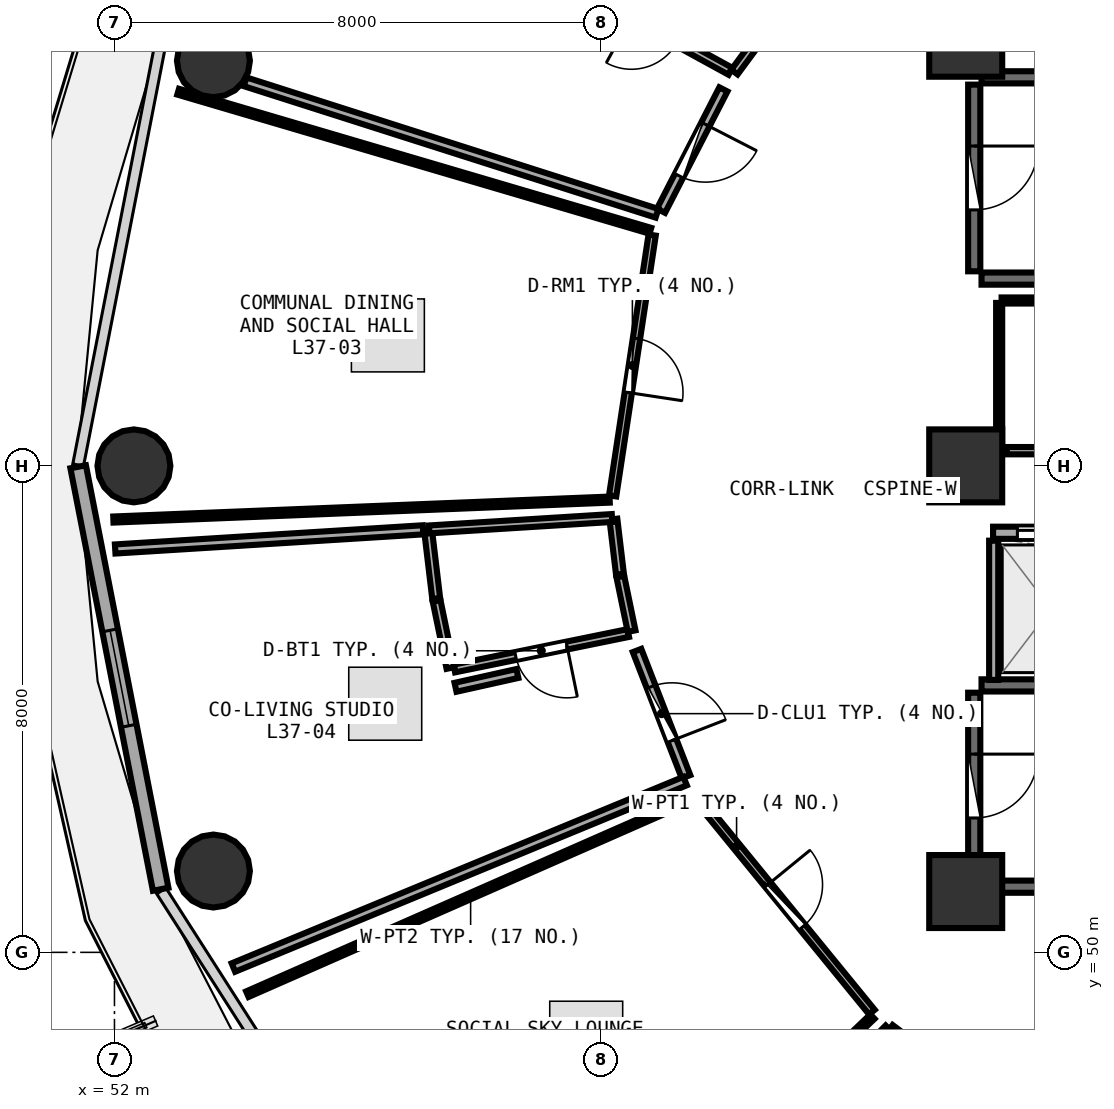
"""IFC4 building model, lengths in metres.
Left out: names, types, materials, properties, quantities, classifications, styles, units other than length and angle.
Written with IfcOpenShell. Run it as: python <this file> out.ifc"""

import sys

from ifc_helpers import new_model, si_unit, direction, frame, frame_2d, origin, origin_2d, place, context, subcontext, project, spatial, rectangle, circle, extrude, element, fill, save


model = new_model("IFC4")
c1 = context("Model", 3, precision=1e-05, world=origin(), true_north=direction((0.0, 1.0)))
c2 = subcontext(c1, "Body", "Model", "MODEL_VIEW")
j1 = project(units=[si_unit("LENGTHUNIT", "METRE"), si_unit("PLANEANGLEUNIT", "RADIAN")], contexts=[c1])
p1 = place(None, origin())
s1 = spatial("IfcSite", under=j1, at=p1, CompositionType="ELEMENT")
p2 = place(p1, origin())
s2 = spatial("IfcBuilding", under=s1, at=p2, CompositionType="ELEMENT")
p3 = place(p2, frame((0.0, 0.0, 146.85)))
s3 = spatial("IfcBuildingStorey", under=s2, at=p3, CompositionType="ELEMENT", Elevation=146.85)
for number, where, z_axis, x_axis in (
    (1, (66.0, 51.0, 0.0), (0.0, 0.0, 1.0), (1.0, 0.0, 0.0)),
    (2, (66.0, 65.0, 0.0), (0.0, 0.0, 1.0), (1.0, 0.0, 0.0)),
    (3, (66.0, 58.0, 0.0), (0.0, 0.0, 1.0), (1.0, 0.0, 0.0)),
):
    element("IfcColumn", number, at=place(p3, frame(where, z_axis=z_axis, x_axis=x_axis)), inside=s3, PredefinedType="PILASTER", context=c2, shape_type="SweptSolid", body=[
        extrude(rectangle(XDim=1.2, YDim=1.2, at=origin_2d()), origin(), (0.0, 0.0, 1.0), 3.75),
    ])
for number, where, z_axis, x_axis in (
    (4, (53.627, 64.663, 0.0), (0.0, 0.0, 1.0), (1.0, 0.0, 0.0)),
    (5, (52.32, 58.0, 0.0), (0.0, 0.0, 1.0), (1.0, 0.0, 0.0)),
    (6, (53.627, 51.337, 0.0), (0.0, 0.0, 1.0), (1.0, 0.0, 0.0)),
):
    element("IfcColumn", number, at=place(p3, frame(where, z_axis=z_axis, x_axis=x_axis)), inside=s3, PredefinedType="COLUMN", context=c2, shape_type="SweptSolid", body=[
        extrude(circle(Radius=0.6, at=origin_2d()), origin(), (0.0, 0.0, 1.0), 3.75),
    ])
p4 = place(p3, frame((51.403, 57.985, 0.0), z_axis=(0.0, 0.0, 1.0), x_axis=(0.191716984769, -0.981450252306, 0.0)))
e7 = element("IfcWall", 7, at=p4, inside=s3, PredefinedType="SOLIDWALL", context=c2, shape_type="SweptSolid", body=[
    extrude(rectangle(XDim=7.079, YDim=0.26, at=frame_2d((3.54, 0.0))), origin(), (0.0, 0.0, 1.0), 3.475),
])
p5 = place(p4, frame((2.74, 0.0, 0.85)))
e8 = element("IfcOpeningElement", 8, at=p5, cuts=e7, PredefinedType="OPENING", context=c2, shape_type="SweptSolid", body=[
    extrude(rectangle(XDim=1.6, YDim=1.45, at=frame_2d((0.8, 0.725))), frame((0.0, 0.14, 0.0), z_axis=(0.0, -1.0, 0.0), x_axis=(1.0, 0.0, 0.0)), (0.0, 0.0, 1.0), 0.28),
])
for number, where, z_axis, x_axis in (
    (9, (66.26, 61.08, 0.0), (0.0, 0.0, 1.0), (1.0, 0.0, 0.0)),
    (10, (73.42, 64.39, 0.0), (0.0, 0.0, 1.0), (-1.0, 0.0, 0.0)),
):
    element("IfcWall", number, at=place(p3, frame(where, z_axis=z_axis, x_axis=x_axis)), inside=s3, PredefinedType="SHEAR", context=c2, shape_type="SweptSolid", body=[
        extrude(rectangle(XDim=7.16, YDim=0.2, at=frame_2d((3.58, 0.0))), origin(), (0.0, 0.0, 1.0), 3.49),
    ])
p6 = place(p3, frame((66.14, 64.27, 0.0), z_axis=(0.0, 0.0, 1.0), x_axis=(0.0, -1.0, 0.0)))
e11 = element("IfcWall", 11, at=p6, inside=s3, PredefinedType="SHEAR", context=c2, shape_type="SweptSolid", body=[
    extrude(rectangle(XDim=3.07, YDim=0.2, at=frame_2d((1.535, 0.0))), origin(), (0.0, 0.0, 1.0), 3.49),
])
p7 = place(p6, frame((1.01, 0.0, 0.0)))
e12 = element("IfcOpeningElement", 12, at=p7, cuts=e11, PredefinedType="OPENING", context=c2, shape_type="SweptSolid", body=[
    extrude(rectangle(XDim=1.05, YDim=2.1, at=frame_2d((0.525, 1.05))), frame((0.0, 0.11, 0.0), z_axis=(0.0, -1.0, 0.0), x_axis=(1.0, 0.0, 0.0)), (0.0, 0.0, 1.0), 0.22),
])
for number, where, z_axis, x_axis in (
    (13, (66.26, 51.08, 0.0), (0.0, 0.0, 1.0), (1.0, 0.0, 0.0)),
    (14, (73.42, 54.39, 0.0), (0.0, 0.0, 1.0), (-1.0, 0.0, 0.0)),
):
    element("IfcWall", number, at=place(p3, frame(where, z_axis=z_axis, x_axis=x_axis)), inside=s3, PredefinedType="SHEAR", context=c2, shape_type="SweptSolid", body=[
        extrude(rectangle(XDim=7.16, YDim=0.2, at=frame_2d((3.58, 0.0))), origin(), (0.0, 0.0, 1.0), 3.49),
    ])
p8 = place(p3, frame((66.14, 54.27, 0.0), z_axis=(0.0, 0.0, 1.0), x_axis=(0.0, -1.0, 0.0)))
e15 = element("IfcWall", 15, at=p8, inside=s3, PredefinedType="SHEAR", context=c2, shape_type="SweptSolid", body=[
    extrude(rectangle(XDim=3.07, YDim=0.2, at=frame_2d((1.535, 0.0))), origin(), (0.0, 0.0, 1.0), 3.49),
])
p9 = place(p8, frame((1.01, 0.0, 0.0)))
e16 = element("IfcOpeningElement", 16, at=p9, cuts=e15, PredefinedType="OPENING", context=c2, shape_type="SweptSolid", body=[
    extrude(rectangle(XDim=1.05, YDim=2.1, at=frame_2d((0.525, 1.05))), frame((0.0, 0.11, 0.0), z_axis=(0.0, -1.0, 0.0), x_axis=(1.0, 0.0, 0.0)), (0.0, 0.0, 1.0), 0.22),
])
p10 = place(p3, frame((66.45, 56.9, 0.0), z_axis=(0.0, 0.0, 1.0), x_axis=(1.0, 0.0, 0.0)))
e17 = element("IfcWall", 17, at=p10, inside=s3, PredefinedType="SOLIDWALL", context=c2, shape_type="SweptSolid", body=[
    extrude(rectangle(XDim=14.4, YDim=0.2, at=frame_2d((7.2, 0.0))), origin(), (0.0, 0.0, 1.0), 3.48),
])
p11 = place(p10, frame((0.4, 0.0, 0.0)))
e18 = element("IfcOpeningElement", 18, at=p11, cuts=e17, PredefinedType="OPENING", context=c2, shape_type="SweptSolid", body=[
    extrude(rectangle(XDim=1.1, YDim=2.1, at=frame_2d((0.55, 1.05))), frame((0.0, 0.11, 0.0), z_axis=(0.0, -1.0, 0.0), x_axis=(1.0, 0.0, 0.0)), (0.0, 0.0, 1.0), 0.22),
])
p12 = place(p10, frame((2.4, 0.0, 0.0)))
e19 = element("IfcOpeningElement", 19, at=p12, cuts=e17, PredefinedType="OPENING", context=c2, shape_type="SweptSolid", body=[
    extrude(rectangle(XDim=1.1, YDim=2.1, at=frame_2d((0.55, 1.05))), frame((0.0, 0.11, 0.0), z_axis=(0.0, -1.0, 0.0), x_axis=(1.0, 0.0, 0.0)), (0.0, 0.0, 1.0), 0.22),
])
p13 = place(p10, frame((4.4, 0.0, 0.0)))
e20 = element("IfcOpeningElement", 20, at=p13, cuts=e17, PredefinedType="OPENING", context=c2, shape_type="SweptSolid", body=[
    extrude(rectangle(XDim=1.1, YDim=2.1, at=frame_2d((0.55, 1.05))), frame((0.0, 0.11, 0.0), z_axis=(0.0, -1.0, 0.0), x_axis=(1.0, 0.0, 0.0)), (0.0, 0.0, 1.0), 0.22),
])
p14 = place(p3, frame((66.46, 54.48, 0.0), z_axis=(0.0, 0.0, 1.0), x_axis=(0.0, 1.0, 0.0)))
e21 = element("IfcWall", 21, at=p14, inside=s3, PredefinedType="PARTITIONING", context=c2, shape_type="SweptSolid", body=[
    extrude(rectangle(XDim=2.29, YDim=0.15, at=frame_2d((1.145, 0.0))), origin(), (0.0, 0.0, 1.0), 3.48),
])
p15 = place(p3, frame((66.675, 58.25, 0.0), z_axis=(0.0, 0.0, 1.0), x_axis=(1.0, 0.0, 0.0)))
e22 = element("IfcWall", 22, at=p15, inside=s3, PredefinedType="PARTITIONING", context=c2, shape_type="SweptSolid", body=[
    extrude(rectangle(XDim=3.265, YDim=0.12, at=frame_2d((1.632, 0.0))), origin(), (0.0, 0.0, 1.0), 3.48),
])
p16 = place(p15, frame((1.182, 0.0, 0.0)))
e23 = element("IfcOpeningElement", 23, at=p16, cuts=e22, PredefinedType="OPENING", context=c2, shape_type="SweptSolid", body=[
    extrude(rectangle(XDim=0.9, YDim=2.08, at=frame_2d((0.45, 1.04))), frame((0.0, 0.07, 0.0), z_axis=(0.0, -1.0, 0.0), x_axis=(1.0, 0.0, 0.0)), (0.0, 0.0, 1.0), 0.14),
])
p17 = place(p3, frame((62.131, 64.489, 0.0), z_axis=(0.0, 0.0, 1.0), x_axis=(-0.87680194327, 0.480851694681, 0.0)))
e24 = element("IfcWall", 24, at=p17, inside=s3, PredefinedType="PLUMBINGWALL", context=c2, shape_type="SweptSolid", body=[
    extrude(rectangle(XDim=2.855, YDim=0.13, at=frame_2d((1.428, 0.0))), origin(), (0.0, 0.0, 1.0), 2.975),
])
p18 = place(p17, frame((0.998, 0.0, 0.0)))
e25 = element("IfcOpeningElement", 25, at=p18, cuts=e24, PredefinedType="OPENING", context=c2, shape_type="SweptSolid", body=[
    extrude(rectangle(XDim=0.86, YDim=2.05, at=frame_2d((0.43, 1.025))), frame((0.0, 0.075, 0.0), z_axis=(0.0, -1.0, 0.0), x_axis=(1.0, 0.0, 0.0)), (0.0, 0.0, 1.0), 0.15),
])
p19 = place(p3, frame((62.015, 64.192, 0.0), z_axis=(0.0, 0.0, 1.0), x_axis=(-0.457234963971, -0.889345932538, 0.0)))
e26 = element("IfcWall", 26, at=p19, inside=s3, PredefinedType="PARTITIONING", context=c2, shape_type="SweptSolid", body=[
    extrude(rectangle(XDim=2.245, YDim=0.15, at=frame_2d((1.122, 0.0))), origin(), (0.0, 0.0, 1.0), 3.235),
])
p20 = place(p19, frame((0.647, 0.0, 0.0)))
e27 = element("IfcOpeningElement", 27, at=p20, cuts=e26, PredefinedType="OPENING", context=c2, shape_type="SweptSolid", body=[
    extrude(rectangle(XDim=0.95, YDim=2.08, at=frame_2d((0.475, 1.04))), frame((0.0, 0.085, 0.0), z_axis=(0.0, -1.0, 0.0), x_axis=(1.0, 0.0, 0.0)), (0.0, 0.0, 1.0), 0.17),
])
p21 = place(p3, frame((60.843, 61.796, 0.0), z_axis=(0.0, 0.0, 1.0), x_axis=(-0.149807046494, -0.988715251638, 0.0)))
e28 = element("IfcWall", 28, at=p21, inside=s3, PredefinedType="PARTITIONING", context=c2, shape_type="SweptSolid", body=[
    extrude(rectangle(XDim=4.338, YDim=0.12, at=frame_2d((2.169, 0.0))), origin(), (0.0, 0.0, 1.0), 2.975),
])
p22 = place(p21, frame((1.719, 0.0, 0.0)))
e29 = element("IfcOpeningElement", 29, at=p22, cuts=e28, PredefinedType="OPENING", context=c2, shape_type="SweptSolid", body=[
    extrude(rectangle(XDim=0.9, YDim=2.08, at=frame_2d((0.45, 1.04))), frame((0.0, 0.07, 0.0), z_axis=(0.0, -1.0, 0.0), x_axis=(1.0, 0.0, 0.0)), (0.0, 0.0, 1.0), 0.14),
])
p23 = place(p3, frame((60.45, 55.251, 0.0), z_axis=(0.0, 0.0, 1.0), x_axis=(-0.979866857251, -0.199652052484, 0.0)))
e30 = element("IfcWall", 30, at=p23, inside=s3, PredefinedType="PLUMBINGWALL", context=c2, shape_type="SweptSolid", body=[
    extrude(rectangle(XDim=2.92, YDim=0.13, at=frame_2d((1.46, 0.0))), origin(), (0.0, 0.0, 1.0), 3.175),
])
p24 = place(p23, frame((1.03, 0.0, 0.0)))
e31 = element("IfcOpeningElement", 31, at=p24, cuts=e30, PredefinedType="OPENING", context=c2, shape_type="SweptSolid", body=[
    extrude(rectangle(XDim=0.86, YDim=2.05, at=frame_2d((0.43, 1.025))), frame((0.0, 0.075, 0.0), z_axis=(0.0, -1.0, 0.0), x_axis=(1.0, 0.0, 0.0)), (0.0, 0.0, 1.0), 0.15),
])
p25 = place(p3, frame((60.595, 54.964, 0.0), z_axis=(0.0, 0.0, 1.0), x_axis=(0.361769005858, -0.932267765398, 0.0)))
e32 = element("IfcWall", 32, at=p25, inside=s3, PredefinedType="PARTITIONING", context=c2, shape_type="SweptSolid", body=[
    extrude(rectangle(XDim=2.227, YDim=0.15, at=frame_2d((1.114, 0.0))), origin(), (0.0, 0.0, 1.0), 3.235),
])
p26 = place(p25, frame((0.639, 0.0, 0.0)))
e33 = element("IfcOpeningElement", 33, at=p26, cuts=e32, PredefinedType="OPENING", context=c2, shape_type="SweptSolid", body=[
    extrude(rectangle(XDim=0.95, YDim=2.08, at=frame_2d((0.475, 1.04))), frame((0.0, 0.085, 0.0), z_axis=(0.0, -1.0, 0.0), x_axis=(1.0, 0.0, 0.0)), (0.0, 0.0, 1.0), 0.17),
])
p27 = place(p3, frame((61.604, 52.511, 0.0), z_axis=(0.0, 0.0, 1.0), x_axis=(0.632491819148, -0.77456703952, 0.0)))
e34 = element("IfcWall", 34, at=p27, inside=s3, PredefinedType="PARTITIONING", context=c2, shape_type="SweptSolid", body=[
    extrude(rectangle(XDim=4.511, YDim=0.12, at=frame_2d((2.255, 0.0))), origin(), (0.0, 0.0, 1.0), 2.975),
])
p28 = place(p27, frame((1.805, 0.0, 0.0)))
e35 = element("IfcOpeningElement", 35, at=p28, cuts=e34, PredefinedType="OPENING", context=c2, shape_type="SweptSolid", body=[
    extrude(rectangle(XDim=0.9, YDim=2.08, at=frame_2d((0.45, 1.04))), frame((0.0, 0.07, 0.0), z_axis=(0.0, -1.0, 0.0), x_axis=(1.0, 0.0, 0.0)), (0.0, 0.0, 1.0), 0.14),
])
p29 = place(p3, frame((69.96, 60.72, 0.0), z_axis=(0.0, 0.0, 1.0), x_axis=(-1.0, 0.0, 0.0)))
e36 = element("IfcWall", 36, at=p29, inside=s3, PredefinedType="PARTITIONING", context=c2, shape_type="SweptSolid", body=[
    extrude(rectangle(XDim=3.37, YDim=0.1, at=frame_2d((1.685, 0.0))), origin(), (0.0, 0.0, 1.0), 3.48),
])
p30 = place(p3, frame((66.55, 60.68, 0.0), z_axis=(0.0, 0.0, 1.0), x_axis=(0.0, -1.0, 0.0)))
e37 = element("IfcWall", 37, at=p30, inside=s3, PredefinedType="PARTITIONING", context=c2, shape_type="SweptSolid", body=[
    extrude(rectangle(XDim=2.383, YDim=0.1, at=frame_2d((1.191, 0.0))), origin(), (0.0, 0.0, 1.0), 3.48),
])
p31 = place(p3, frame((62.757, 65.237, 0.0), z_axis=(0.0, 0.0, 1.0), x_axis=(-0.593701036402, -0.804685702231, 0.0)))
e38 = element("IfcWall", 38, at=p31, inside=s3, PredefinedType="PLUMBINGWALL", context=c2, shape_type="SweptSolid", body=[
    extrude(rectangle(XDim=0.945, YDim=0.13, at=frame_2d((0.473, 0.0))), origin(), (0.0, 0.0, 1.0), 2.975),
])
p32 = place(p3, frame((60.923, 62.154, 0.0), z_axis=(0.0, 0.0, 1.0), x_axis=(-0.952653075659, 0.304059397878, 0.0)))
e39 = element("IfcWall", 39, at=p32, inside=s3, PredefinedType="PARTITIONING", context=c2, shape_type="SweptSolid", body=[
    extrude(rectangle(XDim=7.112, YDim=0.15, at=frame_2d((3.556, 0.0))), origin(), (0.0, 0.0, 1.0), 3.175),
])
p33 = place(p3, frame((60.144, 57.445, 0.0), z_axis=(0.0, 0.0, 1.0), x_axis=(-0.99919531507, -0.040108881097, 0.0)))
e40 = element("IfcWall", 40, at=p33, inside=s3, PredefinedType="PARTITIONING", context=c2, shape_type="SweptSolid", body=[
    extrude(rectangle(XDim=8.169, YDim=0.1, at=frame_2d((4.084, 0.0))), origin(), (0.0, 0.0, 1.0), 3.025),
])
p34 = place(p3, frame((53.047, 64.154, 0.0), z_axis=(0.0, 0.0, 1.0), x_axis=(0.959252584651, -0.282549958133, 0.0)))
e41 = element("IfcWall", 41, at=p34, inside=s3, PredefinedType="PARTITIONING", context=c2, shape_type="SweptSolid", body=[
    extrude(rectangle(XDim=8.096, YDim=0.1, at=frame_2d((4.048, 0.0))), origin(), (0.0, 0.0, 1.0), 3.025),
])
p35 = place(p3, frame((60.205, 57.124, 0.0), z_axis=(0.0, 0.0, 1.0), x_axis=(0.118797046487, -0.992918557459, 0.0)))
e42 = element("IfcWall", 42, at=p35, inside=s3, PredefinedType="PLUMBINGWALL", context=c2, shape_type="SweptSolid", body=[
    extrude(rectangle(XDim=0.912, YDim=0.13, at=frame_2d((0.456, 0.0))), origin(), (0.0, 0.0, 1.0), 3.48),
])
p36 = place(p3, frame((60.32, 56.178, 0.0), z_axis=(0.0, 0.0, 1.0), x_axis=(0.202067144879, -0.979371670491, 0.0)))
e43 = element("IfcWall", 43, at=p36, inside=s3, PredefinedType="PLUMBINGWALL", context=c2, shape_type="SweptSolid", body=[
    extrude(rectangle(XDim=0.915, YDim=0.13, at=frame_2d((0.457, 0.0))), origin(), (0.0, 0.0, 1.0), 3.48),
])
p37 = place(p3, frame((57.526, 54.676, 0.0), z_axis=(0.0, 0.0, 1.0), x_axis=(-0.202111317069, 0.979362555703, 0.0)))
e44 = element("IfcWall", 44, at=p37, inside=s3, PredefinedType="PLUMBINGWALL", context=c2, shape_type="SweptSolid", body=[
    extrude(rectangle(XDim=1.127, YDim=0.13, at=frame_2d((0.563, 0.0))), origin(), (0.0, 0.0, 1.0), 3.48),
])
p38 = place(p3, frame((57.292, 55.819, 0.0), z_axis=(0.0, 0.0, 1.0), x_axis=(-0.11846804652, 0.992957865145, 0.0)))
e45 = element("IfcWall", 45, at=p38, inside=s3, PredefinedType="PLUMBINGWALL", context=c2, shape_type="SweptSolid", body=[
    extrude(rectangle(XDim=1.123, YDim=0.13, at=frame_2d((0.562, 0.0))), origin(), (0.0, 0.0, 1.0), 3.48),
])
p39 = place(p3, frame((57.176, 56.955, 0.0), z_axis=(0.0, 0.0, 1.0), x_axis=(0.998056675164, 0.062312704652, 0.0)))
e46 = element("IfcWall", 46, at=p39, inside=s3, PredefinedType="PLUMBINGWALL", context=c2, shape_type="SweptSolid", body=[
    extrude(rectangle(XDim=3.013, YDim=0.13, at=frame_2d((1.506, 0.0))), origin(), (0.0, 0.0, 1.0), 3.175),
])
p40 = place(p3, frame((61.385, 52.817, 0.0), z_axis=(0.0, 0.0, 1.0), x_axis=(-0.924352507704, -0.381539567412, 0.0)))
e47 = element("IfcWall", 47, at=p40, inside=s3, PredefinedType="PARTITIONING", context=c2, shape_type="SweptSolid", body=[
    extrude(rectangle(XDim=8.037, YDim=0.15, at=frame_2d((4.019, 0.0))), origin(), (0.0, 0.0, 1.0), 2.975),
])
p41 = place(p3, frame((52.012, 56.634, 0.0), z_axis=(0.0, 0.0, 1.0), x_axis=(0.998071814667, 0.062069741162, 0.0)))
e48 = element("IfcWall", 48, at=p41, inside=s3, PredefinedType="PARTITIONING", context=c2, shape_type="SweptSolid", body=[
    extrude(rectangle(XDim=5.074, YDim=0.15, at=frame_2d((2.537, 0.0))), origin(), (0.0, 0.0, 1.0), 3.025),
])
p42 = place(p3, frame((57.609, 54.359, 0.0), z_axis=(0.0, 0.0, 1.0), x_axis=(0.97598825513, 0.217823152693, 0.0)))
e49 = element("IfcWall", 49, at=p42, inside=s3, PredefinedType="PARTITIONING", context=c2, shape_type="SweptSolid", body=[
    extrude(rectangle(XDim=1.042, YDim=0.15, at=frame_2d((0.521, 0.0))), origin(), (0.0, 0.0, 1.0), 3.175),
])
p43 = place(p3, frame((64.466, 48.943, 0.0), z_axis=(0.0, 0.0, 1.0), x_axis=(-0.723511266615, -0.690312572014, 0.0)))
e50 = element("IfcWall", 50, at=p43, inside=s3, PredefinedType="PARTITIONING", context=c2, shape_type="SweptSolid", body=[
    extrude(rectangle(XDim=7.758, YDim=0.1, at=frame_2d((3.879, 0.0))), origin(), (0.0, 0.0, 1.0), 3.025),
])
p44 = place(p3, frame((54.186, 49.312, 0.0), z_axis=(0.0, 0.0, 1.0), x_axis=(0.915373356269, 0.402606034024, 0.0)))
e51 = element("IfcWall", 51, at=p44, inside=s3, PredefinedType="PARTITIONING", context=c2, shape_type="SweptSolid", body=[
    extrude(rectangle(XDim=8.023, YDim=0.1, at=frame_2d((4.011, 0.0))), origin(), (0.0, 0.0, 1.0), 2.975),
])
p45 = place(p3, frame((64.759, 48.753, 0.0), z_axis=(0.0, 0.0, 1.0), x_axis=(0.800390142897, -0.599479456824, 0.0)))
e52 = element("IfcWall", 52, at=p45, inside=s3, PredefinedType="PLUMBINGWALL", context=c2, shape_type="SweptSolid", body=[
    extrude(rectangle(XDim=0.976, YDim=0.13, at=frame_2d((0.488, 0.0))), origin(), (0.0, 0.0, 1.0), 2.975),
])
p46 = place(p3, frame((62.713, 46.733, 0.0), z_axis=(0.0, 0.0, 1.0), x_axis=(0.706764315195, 0.707449081396, 0.0)))
e53 = element("IfcWall", 53, at=p46, inside=s3, PredefinedType="PLUMBINGWALL", context=c2, shape_type="SweptSolid", body=[
    extrude(rectangle(XDim=2.852, YDim=0.13, at=frame_2d((1.426, 0.0))), origin(), (0.0, 0.0, 1.0), 3.235),
])
p47 = place(p5, origin())
e54 = element("IfcWindow", 54, at=p47, inside=s3, PartitioningType="SINGLE_PANEL", PredefinedType="WINDOW", context=c2, shape_type="SweptSolid", body=[
    extrude(rectangle(XDim=1.6, YDim=1.45, at=frame_2d((0.8, 0.725))), frame((0.0, 0.03, 0.0), z_axis=(0.0, -1.0, 0.0), x_axis=(1.0, 0.0, 0.0)), (0.0, 0.0, 1.0), 0.06),
])
fill(e8, e54)
p48 = place(p7, origin())
e55 = element("IfcDoor", 55, at=p48, inside=s3, OperationType="SINGLE_SWING_LEFT", PredefinedType="DOOR", context=c2, shape_type="SweptSolid", body=[
    extrude(rectangle(XDim=1.05, YDim=2.1, at=frame_2d((0.525, 1.05))), frame((0.0, 0.025, 0.0), z_axis=(0.0, -1.0, 0.0), x_axis=(1.0, 0.0, 0.0)), (0.0, 0.0, 1.0), 0.05),
])
fill(e12, e55)
p49 = place(p9, origin())
e56 = element("IfcDoor", 56, at=p49, inside=s3, OperationType="SINGLE_SWING_LEFT", PredefinedType="DOOR", context=c2, shape_type="SweptSolid", body=[
    extrude(rectangle(XDim=1.05, YDim=2.1, at=frame_2d((0.525, 1.05))), frame((0.0, 0.025, 0.0), z_axis=(0.0, -1.0, 0.0), x_axis=(1.0, 0.0, 0.0)), (0.0, 0.0, 1.0), 0.05),
])
fill(e16, e56)
p50 = place(p11, origin())
e57 = element("IfcDoor", 57, at=p50, inside=s3, OperationType="DOUBLE_DOOR_SLIDING", PredefinedType="DOOR", context=c2, shape_type="SweptSolid", body=[
    extrude(rectangle(XDim=1.1, YDim=2.1, at=frame_2d((0.55, 1.05))), frame((0.0, 0.025, 0.0), z_axis=(0.0, -1.0, 0.0), x_axis=(1.0, 0.0, 0.0)), (0.0, 0.0, 1.0), 0.05),
])
fill(e18, e57)
p51 = place(p20, origin())
e58 = element("IfcDoor", 58, at=p51, inside=s3, OperationType="SINGLE_SWING_LEFT", PredefinedType="DOOR", context=c2, shape_type="SweptSolid", body=[
    extrude(rectangle(XDim=0.95, YDim=2.08, at=frame_2d((0.475, 1.04))), frame((0.0, 0.025, 0.0), z_axis=(0.0, -1.0, 0.0), x_axis=(1.0, 0.0, 0.0)), (0.0, 0.0, 1.0), 0.05),
])
fill(e27, e58)
p52 = place(p22, origin())
e59 = element("IfcDoor", 59, at=p52, inside=s3, OperationType="SINGLE_SWING_RIGHT", PredefinedType="DOOR", context=c2, shape_type="SweptSolid", body=[
    extrude(rectangle(XDim=0.9, YDim=2.08, at=frame_2d((0.45, 1.04))), frame((0.0, 0.025, 0.0), z_axis=(0.0, -1.0, 0.0), x_axis=(1.0, 0.0, 0.0)), (0.0, 0.0, 1.0), 0.05),
])
fill(e29, e59)
p53 = place(p24, origin())
e60 = element("IfcDoor", 60, at=p53, inside=s3, OperationType="SINGLE_SWING_LEFT", PredefinedType="DOOR", context=c2, shape_type="SweptSolid", body=[
    extrude(rectangle(XDim=0.86, YDim=2.05, at=frame_2d((0.43, 1.025))), frame((0.0, 0.025, 0.0), z_axis=(0.0, -1.0, 0.0), x_axis=(1.0, 0.0, 0.0)), (0.0, 0.0, 1.0), 0.05),
])
fill(e31, e60)
p54 = place(p26, origin())
e61 = element("IfcDoor", 61, at=p54, inside=s3, OperationType="SINGLE_SWING_RIGHT", PredefinedType="DOOR", context=c2, shape_type="SweptSolid", body=[
    extrude(rectangle(XDim=0.95, YDim=2.08, at=frame_2d((0.475, 1.04))), frame((0.0, 0.025, 0.0), z_axis=(0.0, -1.0, 0.0), x_axis=(1.0, 0.0, 0.0)), (0.0, 0.0, 1.0), 0.05),
])
fill(e33, e61)
p55 = place(p28, origin())
e62 = element("IfcDoor", 62, at=p55, inside=s3, OperationType="SINGLE_SWING_LEFT", PredefinedType="DOOR", context=c2, shape_type="SweptSolid", body=[
    extrude(rectangle(XDim=0.9, YDim=2.08, at=frame_2d((0.45, 1.04))), frame((0.0, 0.025, 0.0), z_axis=(0.0, -1.0, 0.0), x_axis=(1.0, 0.0, 0.0)), (0.0, 0.0, 1.0), 0.05),
])
fill(e35, e62)
save(model, sys.argv[1])
